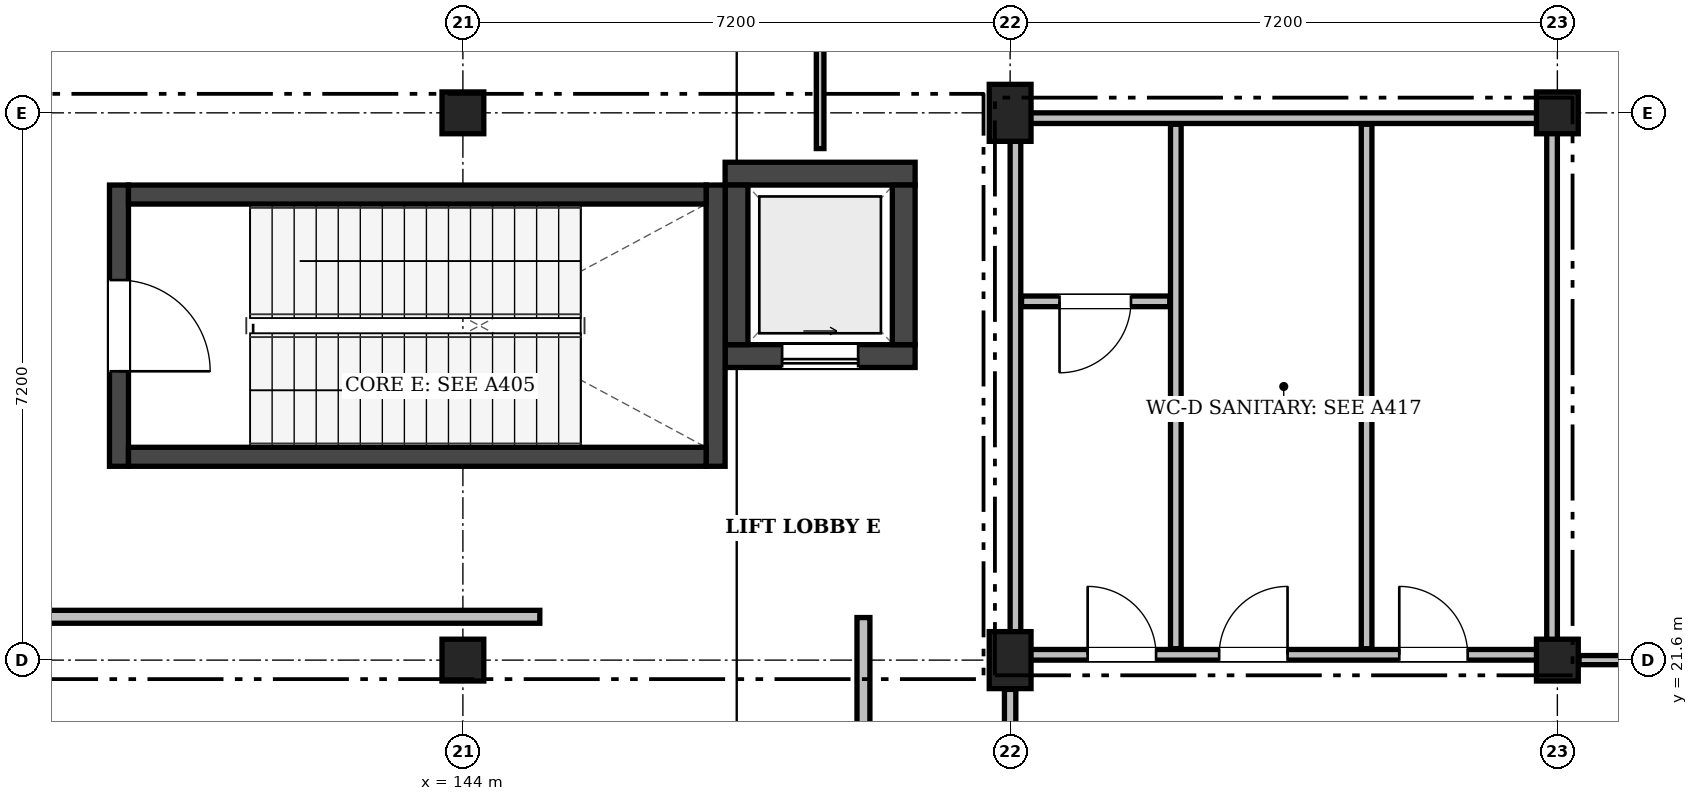
"""IFC4 building model, lengths in metres.
Left out: names, types, materials, properties, quantities, classifications, styles, units other than length and angle.
Written with IfcOpenShell. Run it as: python <this file> out.ifc"""

import sys

from ifc_helpers import new_model, si_unit, direction, frame, frame_2d, origin, origin_2d, place, context, subcontext, project, spatial, rectangle, extrude, element, fill, save


model = new_model("IFC4")
c1 = context("Model", 3, precision=1e-05, world=origin(), true_north=direction((0.0, 1.0)))
c2 = subcontext(c1, "Body", "Model", "MODEL_VIEW")
j1 = project(units=[si_unit("LENGTHUNIT", "METRE"), si_unit("PLANEANGLEUNIT", "RADIAN")], contexts=[c1])
p1 = place(None, origin())
s1 = spatial("IfcSite", under=j1, at=p1, CompositionType="ELEMENT")
p2 = place(p1, origin())
s2 = spatial("IfcBuilding", under=s1, at=p2, CompositionType="ELEMENT")
p3 = place(p2, frame((0.0, 0.0, 4.8)))
s3 = spatial("IfcBuildingStorey", under=s2, at=p3, CompositionType="ELEMENT", Elevation=4.8)
for number, where, z_axis, x_axis in (
    (1, (144.0, 21.6, 0.0), (0.0, 0.0, 1.0), (1.0, 0.0, 0.0)),
    (2, (144.0, 28.8, 0.0), (0.0, 0.0, 1.0), (1.0, 0.0, 0.0)),
):
    element("IfcColumn", number, at=place(p3, frame(where, z_axis=z_axis, x_axis=x_axis)), inside=s3, PredefinedType="COLUMN", context=c2, shape_type="SweptSolid", body=[
        extrude(rectangle(XDim=0.55, YDim=0.55, at=origin_2d()), origin(), (0.0, 0.0, 1.0), 4.8),
    ])
for number, where, z_axis, x_axis in (
    (3, (151.2, 21.6, 0.0), (0.0, 0.0, 1.0), (1.0, 0.0, 0.0)),
    (4, (151.2, 28.8, 0.0), (0.0, 0.0, 1.0), (1.0, 0.0, 0.0)),
):
    element("IfcColumn", number, at=place(p3, frame(where, z_axis=z_axis, x_axis=x_axis)), inside=s3, PredefinedType="COLUMN", context=c2, shape_type="SweptSolid", body=[
        extrude(rectangle(XDim=0.55, YDim=0.75, at=origin_2d()), origin(), (0.0, 0.0, 1.0), 4.8),
    ])
for number, where, z_axis, x_axis in (
    (5, (158.4, 21.6, 0.0), (0.0, 0.0, 1.0), (1.0, 0.0, 0.0)),
    (6, (158.4, 28.8, 0.0), (0.0, 0.0, 1.0), (1.0, 0.0, 0.0)),
):
    element("IfcColumn", number, at=place(p3, frame(where, z_axis=z_axis, x_axis=x_axis)), inside=s3, PredefinedType="COLUMN", context=c2, shape_type="SweptSolid", body=[
        extrude(rectangle(XDim=0.55, YDim=0.55, at=origin_2d()), origin(), (0.0, 0.0, 1.0), 4.8),
    ])
p4 = place(p3, frame((147.45, 25.6, 0.0), z_axis=(0.0, 0.0, 1.0), x_axis=(1.0, 0.0, 0.0)))
e7 = element("IfcWall", 7, at=p4, inside=s3, PredefinedType="SHEAR", context=c2, shape_type="SweptSolid", body=[
    extrude(rectangle(XDim=2.5, YDim=0.3, at=frame_2d((1.25, 0.0))), origin(), (0.0, 0.0, 1.0), 4.55),
])
p5 = place(p4, frame((0.75, 0.0, 0.0)))
e8 = element("IfcOpeningElement", 8, at=p5, cuts=e7, PredefinedType="OPENING", context=c2, shape_type="SweptSolid", body=[
    extrude(rectangle(XDim=1.0, YDim=2.1, at=frame_2d((0.5, 1.05))), frame((0.0, 0.162, 0.0), z_axis=(0.0, -1.0, 0.0), x_axis=(1.0, 0.0, 0.0)), (0.0, 0.0, 1.0), 0.324),
])
p6 = place(p3, frame((147.45, 28.0, 0.0), z_axis=(0.0, 0.0, 1.0), x_axis=(1.0, 0.0, 0.0)))
e9 = element("IfcWall", 9, at=p6, inside=s3, PredefinedType="SHEAR", context=c2, shape_type="SweptSolid", body=[
    extrude(rectangle(XDim=2.5, YDim=0.3, at=frame_2d((1.25, 0.0))), origin(), (0.0, 0.0, 1.0), 4.55),
])
for number, where, z_axis, x_axis in (
    (10, (147.6, 25.75, 0.0), (0.0, 0.0, 1.0), (0.0, 1.0, 0.0)),
    (11, (149.8, 25.75, 0.0), (0.0, 0.0, 1.0), (0.0, 1.0, 0.0)),
):
    element("IfcWall", number, at=place(p3, frame(where, z_axis=z_axis, x_axis=x_axis)), inside=s3, PredefinedType="SHEAR", context=c2, shape_type="SweptSolid", body=[
        extrude(rectangle(XDim=2.1, YDim=0.3, at=frame_2d((1.05, 0.0))), origin(), (0.0, 0.0, 1.0), 4.55),
    ])
p7 = place(p3, frame((139.475, 24.15, 0.0), z_axis=(0.0, 0.0, 1.0), x_axis=(0.0, 1.0, 0.0)))
e12 = element("IfcWall", 12, at=p7, inside=s3, PredefinedType="SHEAR", context=c2, shape_type="SweptSolid", body=[
    extrude(rectangle(XDim=3.7, YDim=0.25, at=frame_2d((1.85, 0.0))), origin(), (0.0, 0.0, 1.0), 4.55),
])
p8 = place(p7, frame((1.25, 0.0, 0.0)))
e13 = element("IfcOpeningElement", 13, at=p8, cuts=e12, PredefinedType="OPENING", context=c2, shape_type="SweptSolid", body=[
    extrude(rectangle(XDim=1.2, YDim=2.15, at=frame_2d((0.6, 1.075))), frame((0.0, 0.137, 0.0), z_axis=(0.0, -1.0, 0.0), x_axis=(1.0, 0.0, 0.0)), (0.0, 0.0, 1.0), 0.274),
])
p9 = place(p3, frame((147.325, 24.15, 0.0), z_axis=(0.0, 0.0, 1.0), x_axis=(0.0, 1.0, 0.0)))
e14 = element("IfcWall", 14, at=p9, inside=s3, PredefinedType="SHEAR", context=c2, shape_type="SweptSolid", body=[
    extrude(rectangle(XDim=3.7, YDim=0.25, at=frame_2d((1.85, 0.0))), origin(), (0.0, 0.0, 1.0), 4.55),
])
for number, where, z_axis, x_axis in (
    (15, (139.6, 24.275, 0.0), (0.0, 0.0, 1.0), (1.0, 0.0, 0.0)),
    (16, (139.6, 27.725, 0.0), (0.0, 0.0, 1.0), (1.0, 0.0, 0.0)),
):
    element("IfcWall", number, at=place(p3, frame(where, z_axis=z_axis, x_axis=x_axis)), inside=s3, PredefinedType="SHEAR", context=c2, shape_type="SweptSolid", body=[
        extrude(rectangle(XDim=7.6, YDim=0.25, at=frame_2d((3.8, 0.0))), origin(), (0.0, 0.0, 1.0), 4.55),
    ])
p10 = place(p3, frame((151.27, 21.67, 0.0), z_axis=(0.0, 0.0, 1.0), x_axis=(1.0, 0.0, 0.0)))
e17 = element("IfcWall", 17, at=p10, inside=s3, PredefinedType="PARTITIONING", context=c2, shape_type="SweptSolid", body=[
    extrude(rectangle(XDim=7.06, YDim=0.14, at=frame_2d((3.53, 0.0))), origin(), (0.0, 0.0, 1.0), 3.9),
])
p11 = place(p10, frame((0.95, 0.0, 0.0)))
e18 = element("IfcOpeningElement", 18, at=p11, cuts=e17, PredefinedType="OPENING", context=c2, shape_type="SweptSolid", body=[
    extrude(rectangle(XDim=0.9, YDim=2.08, at=frame_2d((0.45, 1.04))), frame((0.0, 0.082, 0.0), z_axis=(0.0, -1.0, 0.0), x_axis=(1.0, 0.0, 0.0)), (0.0, 0.0, 1.0), 0.164),
])
p12 = place(p10, frame((2.68, 0.0, 0.0)))
e19 = element("IfcOpeningElement", 19, at=p12, cuts=e17, PredefinedType="OPENING", context=c2, shape_type="SweptSolid", body=[
    extrude(rectangle(XDim=0.9, YDim=2.08, at=frame_2d((0.45, 1.04))), frame((0.0, 0.082, 0.0), z_axis=(0.0, -1.0, 0.0), x_axis=(1.0, 0.0, 0.0)), (0.0, 0.0, 1.0), 0.164),
])
p13 = place(p10, frame((5.05, 0.0, 0.0)))
e20 = element("IfcOpeningElement", 20, at=p13, cuts=e17, PredefinedType="OPENING", context=c2, shape_type="SweptSolid", body=[
    extrude(rectangle(XDim=0.9, YDim=2.08, at=frame_2d((0.45, 1.04))), frame((0.0, 0.082, 0.0), z_axis=(0.0, -1.0, 0.0), x_axis=(1.0, 0.0, 0.0)), (0.0, 0.0, 1.0), 0.164),
])
p14 = place(p3, frame((151.27, 28.73, 0.0), z_axis=(0.0, 0.0, 1.0), x_axis=(1.0, 0.0, 0.0)))
e21 = element("IfcWall", 21, at=p14, inside=s3, PredefinedType="PARTITIONING", context=c2, shape_type="SweptSolid", body=[
    extrude(rectangle(XDim=7.06, YDim=0.14, at=frame_2d((3.53, 0.0))), origin(), (0.0, 0.0, 1.0), 3.9),
])
for number, where, z_axis, x_axis in (
    (22, (151.27, 21.75, 0.0), (0.0, 0.0, 1.0), (0.0, 1.0, 0.0)),
    (23, (158.33, 21.75, 0.0), (0.0, 0.0, 1.0), (0.0, 1.0, 0.0)),
):
    element("IfcWall", number, at=place(p3, frame(where, z_axis=z_axis, x_axis=x_axis)), inside=s3, PredefinedType="PARTITIONING", context=c2, shape_type="SweptSolid", body=[
        extrude(rectangle(XDim=6.9, YDim=0.14, at=frame_2d((3.45, 0.0))), origin(), (0.0, 0.0, 1.0), 4.08),
    ])
for number, where, z_axis, x_axis in (
    (24, (153.38, 21.75, 0.0), (0.0, 0.0, 1.0), (0.0, 1.0, 0.0)),
    (25, (155.89, 21.75, 0.0), (0.0, 0.0, 1.0), (0.0, 1.0, 0.0)),
):
    element("IfcWall", number, at=place(p3, frame(where, z_axis=z_axis, x_axis=x_axis)), inside=s3, PredefinedType="PARTITIONING", context=c2, shape_type="SweptSolid", body=[
        extrude(rectangle(XDim=6.9, YDim=0.14, at=frame_2d((3.45, 0.0))), origin(), (0.0, 0.0, 1.0), 4.46),
    ])
p15 = place(p3, frame((151.35, 26.32, 0.0), z_axis=(0.0, 0.0, 1.0), x_axis=(1.0, 0.0, 0.0)))
e26 = element("IfcWall", 26, at=p15, inside=s3, PredefinedType="PARTITIONING", context=c2, shape_type="SweptSolid", body=[
    extrude(rectangle(XDim=1.95, YDim=0.14, at=frame_2d((0.975, 0.0))), origin(), (0.0, 0.0, 1.0), 4.46),
])
p16 = place(p15, frame((0.5, 0.0, 0.0)))
e27 = element("IfcOpeningElement", 27, at=p16, cuts=e26, PredefinedType="OPENING", context=c2, shape_type="SweptSolid", body=[
    extrude(rectangle(XDim=0.94, YDim=2.1, at=frame_2d((0.47, 1.05))), frame((0.0, 0.082, 0.0), z_axis=(0.0, -1.0, 0.0), x_axis=(1.0, 0.0, 0.0)), (0.0, 0.0, 1.0), 0.164),
])
p17 = place(p3, frame((149.27, 19.698, 0.0), z_axis=(0.0, 0.0, 1.0), x_axis=(0.0, 1.0, 0.0)))
e28 = element("IfcWall", 28, at=p17, inside=s3, PredefinedType="PARTITIONING", context=c2, shape_type="SweptSolid", body=[
    extrude(rectangle(XDim=2.462, YDim=0.17, at=frame_2d((1.231, 0.0))), origin(), (0.0, 0.0, 1.0), 4.46),
])
p18 = place(p3, frame((129.04, 22.17, 0.0), z_axis=(0.0, 0.0, 1.0), x_axis=(1.0, 0.0, 0.0)))
e29 = element("IfcWall", 29, at=p18, inside=s3, PredefinedType="PARTITIONING", context=c2, shape_type="SweptSolid", body=[
    extrude(rectangle(XDim=15.972, YDim=0.17, at=frame_2d((7.986, 0.0))), origin(), (0.0, 0.0, 1.0), 4.46),
])
p19 = place(p3, frame((151.2, 14.785, 0.0), z_axis=(0.0, 0.0, 1.0), x_axis=(0.0, 1.0, 0.0)))
e30 = element("IfcWall", 30, at=p19, inside=s3, PredefinedType="PARTITIONING", context=c2, shape_type="SweptSolid", body=[
    extrude(rectangle(XDim=6.43, YDim=0.15, at=frame_2d((3.215, 0.0))), origin(), (0.0, 0.0, 1.0), 4.08),
])
p20 = place(p3, frame((158.685, 21.6, 0.0), z_axis=(0.0, 0.0, 1.0), x_axis=(1.0, 0.0, 0.0)))
e31 = element("IfcWall", 31, at=p20, inside=s3, PredefinedType="PARTITIONING", context=c2, shape_type="SweptSolid", body=[
    extrude(rectangle(XDim=6.753, YDim=0.12, at=frame_2d((3.376, 0.0))), origin(), (0.0, 0.0, 1.0), 3.9),
])
p21 = place(p3, frame((148.7, 28.33, 0.0), z_axis=(0.0, 0.0, 1.0), x_axis=(0.0, 1.0, 0.0)))
e32 = element("IfcWall", 32, at=p21, inside=s3, PredefinedType="PARTITIONING", context=c2, shape_type="SweptSolid", body=[
    extrude(rectangle(XDim=7.605, YDim=0.1, at=frame_2d((3.802, 0.0))), origin(), (0.0, 0.0, 1.0), 4.46),
])
p22 = place(p21, frame((3.282, 0.0, 0.0)))
e33 = element("IfcOpeningElement", 33, at=p22, cuts=e32, PredefinedType="OPENING", context=c2, shape_type="SweptSolid", body=[
    extrude(rectangle(XDim=1.04, YDim=2.18, at=frame_2d((0.52, 1.09))), frame((0.0, 0.062, 0.0), z_axis=(0.0, -1.0, 0.0), x_axis=(1.0, 0.0, 0.0)), (0.0, 0.0, 1.0), 0.124),
])
p23 = place(p5, frame((1.0, 0.0, 0.0), z_axis=(0.0, 0.0, 1.0), x_axis=(-1.0, 0.0, 0.0)))
e34 = element("IfcDoor", 34, at=p23, inside=s3, OperationType="SLIDING_TO_RIGHT", PredefinedType="DOOR", context=c2, shape_type="SweptSolid", body=[
    extrude(rectangle(XDim=1.0, YDim=2.1, at=frame_2d((0.5, 1.05))), frame((0.0, 0.025, 0.0), z_axis=(0.0, -1.0, 0.0), x_axis=(1.0, 0.0, 0.0)), (0.0, 0.0, 1.0), 0.05),
])
fill(e8, e34)
p24 = place(p8, frame((1.2, 0.0, 0.0), z_axis=(0.0, 0.0, 1.0), x_axis=(-1.0, 0.0, 0.0)))
e35 = element("IfcDoor", 35, at=p24, inside=s3, OperationType="SINGLE_SWING_RIGHT", PredefinedType="DOOR", context=c2, shape_type="SweptSolid", body=[
    extrude(rectangle(XDim=1.2, YDim=2.15, at=frame_2d((0.6, 1.075))), frame((0.0, 0.025, 0.0), z_axis=(0.0, -1.0, 0.0), x_axis=(1.0, 0.0, 0.0)), (0.0, 0.0, 1.0), 0.05),
])
fill(e13, e35)
p25 = place(p11, origin())
e36 = element("IfcDoor", 36, at=p25, inside=s3, OperationType="SINGLE_SWING_LEFT", PredefinedType="DOOR", context=c2, shape_type="SweptSolid", body=[
    extrude(rectangle(XDim=0.9, YDim=2.08, at=frame_2d((0.45, 1.04))), frame((0.0, 0.025, 0.0), z_axis=(0.0, -1.0, 0.0), x_axis=(1.0, 0.0, 0.0)), (0.0, 0.0, 1.0), 0.05),
])
fill(e18, e36)
p26 = place(p12, origin())
e37 = element("IfcDoor", 37, at=p26, inside=s3, OperationType="SINGLE_SWING_RIGHT", PredefinedType="DOOR", context=c2, shape_type="SweptSolid", body=[
    extrude(rectangle(XDim=0.9, YDim=2.08, at=frame_2d((0.45, 1.04))), frame((0.0, 0.025, 0.0), z_axis=(0.0, -1.0, 0.0), x_axis=(1.0, 0.0, 0.0)), (0.0, 0.0, 1.0), 0.05),
])
fill(e19, e37)
p27 = place(p13, origin())
e38 = element("IfcDoor", 38, at=p27, inside=s3, OperationType="SINGLE_SWING_LEFT", PredefinedType="DOOR", context=c2, shape_type="SweptSolid", body=[
    extrude(rectangle(XDim=0.9, YDim=2.08, at=frame_2d((0.45, 1.04))), frame((0.0, 0.025, 0.0), z_axis=(0.0, -1.0, 0.0), x_axis=(1.0, 0.0, 0.0)), (0.0, 0.0, 1.0), 0.05),
])
fill(e20, e38)
p28 = place(p16, frame((0.94, 0.0, 0.0), z_axis=(0.0, 0.0, 1.0), x_axis=(-1.0, 0.0, 0.0)))
e39 = element("IfcDoor", 39, at=p28, inside=s3, OperationType="SINGLE_SWING_RIGHT", PredefinedType="DOOR", context=c2, shape_type="SweptSolid", body=[
    extrude(rectangle(XDim=0.94, YDim=2.1, at=frame_2d((0.47, 1.05))), frame((0.0, 0.025, 0.0), z_axis=(0.0, -1.0, 0.0), x_axis=(1.0, 0.0, 0.0)), (0.0, 0.0, 1.0), 0.05),
])
fill(e27, e39)
save(model, sys.argv[1])
